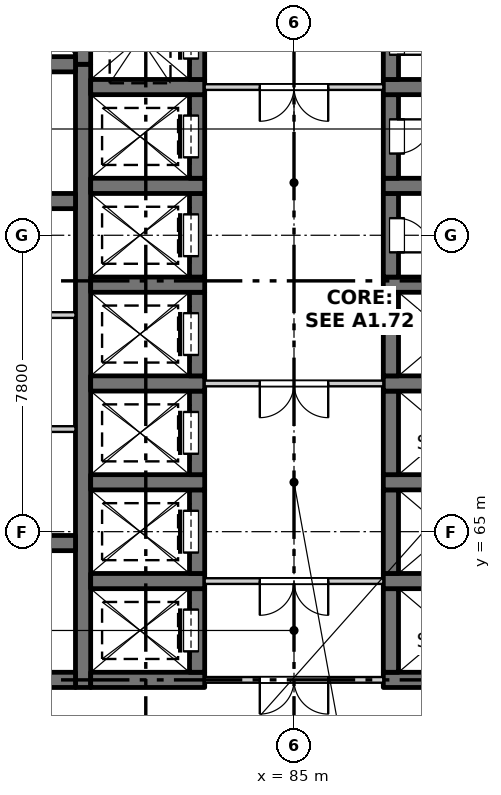
"""IFC4 building model, lengths in metres.
Left out: names, types, materials, properties, quantities, classifications, styles, units other than length and angle.
Written with IfcOpenShell. Run it as: python <this file> out.ifc"""

import sys

from ifc_helpers import new_model, si_unit, direction, frame, frame_2d, origin, place, context, subcontext, project, spatial, rectangle, extrude, element, fill, save


model = new_model("IFC4")
c1 = context("Model", 3, precision=1e-05, world=origin(), true_north=direction((0.0, 1.0)))
c2 = subcontext(c1, "Body", "Model", "MODEL_VIEW")
j1 = project(units=[si_unit("LENGTHUNIT", "METRE"), si_unit("PLANEANGLEUNIT", "RADIAN")], contexts=[c1])
p1 = place(None, origin())
s1 = spatial("IfcSite", under=j1, at=p1, CompositionType="ELEMENT")
p2 = place(p1, origin())
s2 = spatial("IfcBuilding", under=s1, at=p2, CompositionType="ELEMENT")
p3 = place(p2, frame((0.0, 0.0, 15.0)))
s3 = spatial("IfcBuildingStorey", under=s2, at=p3, CompositionType="ELEMENT", Elevation=15.0)
p4 = place(p3, frame((79.45, 60.9, -0.35), z_axis=(0.0, 0.0, 1.0), x_axis=(0.0, 1.0, 0.0)))
e1 = element("IfcWall", 1, at=p4, inside=s3, PredefinedType="SOLIDWALL", context=c2, shape_type="SweptSolid", body=[
    extrude(rectangle(XDim=16.4, YDim=0.4, at=frame_2d((8.2, 0.0))), origin(), (0.0, 0.0, 1.0), 4.6),
])
p5 = place(p3, frame((79.45, 77.3, -0.35), z_axis=(0.0, 0.0, 1.0), x_axis=(0.0, 1.0, 0.0)))
e2 = element("IfcWall", 2, at=p5, inside=s3, PredefinedType="SOLIDWALL", context=c2, shape_type="SweptSolid", body=[
    extrude(rectangle(XDim=6.85, YDim=0.4, at=frame_2d((3.425, 0.0))), origin(), (0.0, 0.0, 1.0), 4.6),
])
p6 = place(p3, frame((79.65, 61.1, -0.35), z_axis=(0.0, 0.0, 1.0), x_axis=(1.0, 0.0, 0.0)))
e3 = element("IfcWall", 3, at=p6, inside=s3, PredefinedType="SOLIDWALL", context=c2, shape_type="SweptSolid", body=[
    extrude(rectangle(XDim=3.0, YDim=0.4, at=frame_2d((1.5, 0.0))), origin(), (0.0, 0.0, 1.0), 4.6),
])
p7 = place(p3, frame((82.45, 61.3, -0.35), z_axis=(0.0, 0.0, 1.0), x_axis=(0.0, 1.0, 0.0)))
e4 = element("IfcWall", 4, at=p7, inside=s3, PredefinedType="SOLIDWALL", context=c2, shape_type="SweptSolid", body=[
    extrude(rectangle(XDim=2.2, YDim=0.4, at=frame_2d((1.1, 0.0))), origin(), (0.0, 0.0, 1.0), 4.6),
])
p8 = place(p7, frame((0.55, 0.0, 0.35)))
e5 = element("IfcOpeningElement", 5, at=p8, cuts=e4, PredefinedType="OPENING", context=c2, shape_type="SweptSolid", body=[
    extrude(rectangle(XDim=1.1, YDim=2.1, at=frame_2d((0.55, 1.05))), frame((0.0, 0.21, 0.0), z_axis=(0.0, -1.0, 0.0), x_axis=(1.0, 0.0, 0.0)), (0.0, 0.0, 1.0), 0.42),
])
p9 = place(p3, frame((79.65, 63.7, -0.35), z_axis=(0.0, 0.0, 1.0), x_axis=(1.0, 0.0, 0.0)))
e6 = element("IfcWall", 6, at=p9, inside=s3, PredefinedType="SOLIDWALL", context=c2, shape_type="SweptSolid", body=[
    extrude(rectangle(XDim=3.0, YDim=0.4, at=frame_2d((1.5, 0.0))), origin(), (0.0, 0.0, 1.0), 4.6),
])
p10 = place(p3, frame((82.45, 63.9, -0.35), z_axis=(0.0, 0.0, 1.0), x_axis=(0.0, 1.0, 0.0)))
e7 = element("IfcWall", 7, at=p10, inside=s3, PredefinedType="SOLIDWALL", context=c2, shape_type="SweptSolid", body=[
    extrude(rectangle(XDim=2.2, YDim=0.4, at=frame_2d((1.1, 0.0))), origin(), (0.0, 0.0, 1.0), 4.6),
])
p11 = place(p10, frame((0.55, 0.0, 0.35)))
e8 = element("IfcOpeningElement", 8, at=p11, cuts=e7, PredefinedType="OPENING", context=c2, shape_type="SweptSolid", body=[
    extrude(rectangle(XDim=1.1, YDim=2.1, at=frame_2d((0.55, 1.05))), frame((0.0, 0.21, 0.0), z_axis=(0.0, -1.0, 0.0), x_axis=(1.0, 0.0, 0.0)), (0.0, 0.0, 1.0), 0.42),
])
p12 = place(p3, frame((79.65, 66.3, -0.35), z_axis=(0.0, 0.0, 1.0), x_axis=(1.0, 0.0, 0.0)))
e9 = element("IfcWall", 9, at=p12, inside=s3, PredefinedType="SOLIDWALL", context=c2, shape_type="SweptSolid", body=[
    extrude(rectangle(XDim=3.0, YDim=0.4, at=frame_2d((1.5, 0.0))), origin(), (0.0, 0.0, 1.0), 4.6),
])
p13 = place(p3, frame((82.45, 66.5, -0.35), z_axis=(0.0, 0.0, 1.0), x_axis=(0.0, 1.0, 0.0)))
e10 = element("IfcWall", 10, at=p13, inside=s3, PredefinedType="SOLIDWALL", context=c2, shape_type="SweptSolid", body=[
    extrude(rectangle(XDim=2.2, YDim=0.4, at=frame_2d((1.1, 0.0))), origin(), (0.0, 0.0, 1.0), 4.6),
])
p14 = place(p13, frame((0.55, 0.0, 0.35)))
e11 = element("IfcOpeningElement", 11, at=p14, cuts=e10, PredefinedType="OPENING", context=c2, shape_type="SweptSolid", body=[
    extrude(rectangle(XDim=1.1, YDim=2.1, at=frame_2d((0.55, 1.05))), frame((0.0, 0.21, 0.0), z_axis=(0.0, -1.0, 0.0), x_axis=(1.0, 0.0, 0.0)), (0.0, 0.0, 1.0), 0.42),
])
p15 = place(p3, frame((79.65, 68.9, -0.35), z_axis=(0.0, 0.0, 1.0), x_axis=(1.0, 0.0, 0.0)))
e12 = element("IfcWall", 12, at=p15, inside=s3, PredefinedType="SOLIDWALL", context=c2, shape_type="SweptSolid", body=[
    extrude(rectangle(XDim=3.0, YDim=0.4, at=frame_2d((1.5, 0.0))), origin(), (0.0, 0.0, 1.0), 4.6),
])
p16 = place(p3, frame((82.45, 69.1, -0.35), z_axis=(0.0, 0.0, 1.0), x_axis=(0.0, 1.0, 0.0)))
e13 = element("IfcWall", 13, at=p16, inside=s3, PredefinedType="SOLIDWALL", context=c2, shape_type="SweptSolid", body=[
    extrude(rectangle(XDim=2.2, YDim=0.4, at=frame_2d((1.1, 0.0))), origin(), (0.0, 0.0, 1.0), 4.6),
])
p17 = place(p16, frame((0.55, 0.0, 0.35)))
e14 = element("IfcOpeningElement", 14, at=p17, cuts=e13, PredefinedType="OPENING", context=c2, shape_type="SweptSolid", body=[
    extrude(rectangle(XDim=1.1, YDim=2.1, at=frame_2d((0.55, 1.05))), frame((0.0, 0.21, 0.0), z_axis=(0.0, -1.0, 0.0), x_axis=(1.0, 0.0, 0.0)), (0.0, 0.0, 1.0), 0.42),
])
p18 = place(p3, frame((79.65, 71.5, -0.35), z_axis=(0.0, 0.0, 1.0), x_axis=(1.0, 0.0, 0.0)))
e15 = element("IfcWall", 15, at=p18, inside=s3, PredefinedType="SOLIDWALL", context=c2, shape_type="SweptSolid", body=[
    extrude(rectangle(XDim=3.0, YDim=0.4, at=frame_2d((1.5, 0.0))), origin(), (0.0, 0.0, 1.0), 4.6),
])
p19 = place(p3, frame((82.45, 71.7, -0.35), z_axis=(0.0, 0.0, 1.0), x_axis=(0.0, 1.0, 0.0)))
e16 = element("IfcWall", 16, at=p19, inside=s3, PredefinedType="SOLIDWALL", context=c2, shape_type="SweptSolid", body=[
    extrude(rectangle(XDim=2.2, YDim=0.4, at=frame_2d((1.1, 0.0))), origin(), (0.0, 0.0, 1.0), 4.6),
])
p20 = place(p19, frame((0.55, 0.0, 0.35)))
e17 = element("IfcOpeningElement", 17, at=p20, cuts=e16, PredefinedType="OPENING", context=c2, shape_type="SweptSolid", body=[
    extrude(rectangle(XDim=1.1, YDim=2.1, at=frame_2d((0.55, 1.05))), frame((0.0, 0.21, 0.0), z_axis=(0.0, -1.0, 0.0), x_axis=(1.0, 0.0, 0.0)), (0.0, 0.0, 1.0), 0.42),
])
p21 = place(p3, frame((79.65, 74.1, -0.35), z_axis=(0.0, 0.0, 1.0), x_axis=(1.0, 0.0, 0.0)))
e18 = element("IfcWall", 18, at=p21, inside=s3, PredefinedType="SOLIDWALL", context=c2, shape_type="SweptSolid", body=[
    extrude(rectangle(XDim=3.0, YDim=0.4, at=frame_2d((1.5, 0.0))), origin(), (0.0, 0.0, 1.0), 4.6),
])
p22 = place(p3, frame((82.45, 74.3, -0.35), z_axis=(0.0, 0.0, 1.0), x_axis=(0.0, 1.0, 0.0)))
e19 = element("IfcWall", 19, at=p22, inside=s3, PredefinedType="SOLIDWALL", context=c2, shape_type="SweptSolid", body=[
    extrude(rectangle(XDim=2.2, YDim=0.4, at=frame_2d((1.1, 0.0))), origin(), (0.0, 0.0, 1.0), 4.6),
])
p23 = place(p22, frame((0.55, 0.0, 0.35)))
e20 = element("IfcOpeningElement", 20, at=p23, cuts=e19, PredefinedType="OPENING", context=c2, shape_type="SweptSolid", body=[
    extrude(rectangle(XDim=1.1, YDim=2.1, at=frame_2d((0.55, 1.05))), frame((0.0, 0.21, 0.0), z_axis=(0.0, -1.0, 0.0), x_axis=(1.0, 0.0, 0.0)), (0.0, 0.0, 1.0), 0.42),
])
p24 = place(p3, frame((79.65, 76.7, -0.35), z_axis=(0.0, 0.0, 1.0), x_axis=(1.0, 0.0, 0.0)))
e21 = element("IfcWall", 21, at=p24, inside=s3, PredefinedType="SOLIDWALL", context=c2, shape_type="SweptSolid", body=[
    extrude(rectangle(XDim=3.0, YDim=0.4, at=frame_2d((1.5, 0.0))), origin(), (0.0, 0.0, 1.0), 4.6),
])
p25 = place(p3, frame((82.45, 76.9, -0.35), z_axis=(0.0, 0.0, 1.0), x_axis=(0.0, 1.0, 0.0)))
e22 = element("IfcWall", 22, at=p25, inside=s3, PredefinedType="SOLIDWALL", context=c2, shape_type="SweptSolid", body=[
    extrude(rectangle(XDim=2.2, YDim=0.4, at=frame_2d((1.1, 0.0))), origin(), (0.0, 0.0, 1.0), 4.6),
])
p26 = place(p25, frame((0.55, 0.0, 0.35)))
e23 = element("IfcOpeningElement", 23, at=p26, cuts=e22, PredefinedType="OPENING", context=c2, shape_type="SweptSolid", body=[
    extrude(rectangle(XDim=1.1, YDim=2.1, at=frame_2d((0.55, 1.05))), frame((0.0, 0.21, 0.0), z_axis=(0.0, -1.0, 0.0), x_axis=(1.0, 0.0, 0.0)), (0.0, 0.0, 1.0), 0.42),
])
p27 = place(p3, frame((87.35, 61.1, -0.35), z_axis=(0.0, 0.0, 1.0), x_axis=(1.0, 0.0, 0.0)))
e24 = element("IfcWall", 24, at=p27, inside=s3, PredefinedType="SOLIDWALL", context=c2, shape_type="SweptSolid", body=[
    extrude(rectangle(XDim=3.0, YDim=0.4, at=frame_2d((1.5, 0.0))), origin(), (0.0, 0.0, 1.0), 4.6),
])
p28 = place(p3, frame((87.55, 61.3, -0.35), z_axis=(0.0, 0.0, 1.0), x_axis=(0.0, 1.0, 0.0)))
e25 = element("IfcWall", 25, at=p28, inside=s3, PredefinedType="SOLIDWALL", context=c2, shape_type="SweptSolid", body=[
    extrude(rectangle(XDim=2.2, YDim=0.4, at=frame_2d((1.1, 0.0))), origin(), (0.0, 0.0, 1.0), 4.6),
])
p29 = place(p3, frame((87.35, 63.7, -0.35), z_axis=(0.0, 0.0, 1.0), x_axis=(1.0, 0.0, 0.0)))
e26 = element("IfcWall", 26, at=p29, inside=s3, PredefinedType="SOLIDWALL", context=c2, shape_type="SweptSolid", body=[
    extrude(rectangle(XDim=3.0, YDim=0.4, at=frame_2d((1.5, 0.0))), origin(), (0.0, 0.0, 1.0), 4.6),
])
p30 = place(p3, frame((87.55, 63.9, -0.35), z_axis=(0.0, 0.0, 1.0), x_axis=(0.0, 1.0, 0.0)))
e27 = element("IfcWall", 27, at=p30, inside=s3, PredefinedType="SOLIDWALL", context=c2, shape_type="SweptSolid", body=[
    extrude(rectangle(XDim=2.2, YDim=0.4, at=frame_2d((1.1, 0.0))), origin(), (0.0, 0.0, 1.0), 4.6),
])
p31 = place(p3, frame((87.35, 66.3, -0.35), z_axis=(0.0, 0.0, 1.0), x_axis=(1.0, 0.0, 0.0)))
e28 = element("IfcWall", 28, at=p31, inside=s3, PredefinedType="SOLIDWALL", context=c2, shape_type="SweptSolid", body=[
    extrude(rectangle(XDim=3.0, YDim=0.4, at=frame_2d((1.5, 0.0))), origin(), (0.0, 0.0, 1.0), 4.6),
])
p32 = place(p3, frame((87.55, 66.5, -0.35), z_axis=(0.0, 0.0, 1.0), x_axis=(0.0, 1.0, 0.0)))
e29 = element("IfcWall", 29, at=p32, inside=s3, PredefinedType="SOLIDWALL", context=c2, shape_type="SweptSolid", body=[
    extrude(rectangle(XDim=2.2, YDim=0.4, at=frame_2d((1.1, 0.0))), origin(), (0.0, 0.0, 1.0), 4.6),
])
p33 = place(p3, frame((87.35, 68.9, -0.35), z_axis=(0.0, 0.0, 1.0), x_axis=(1.0, 0.0, 0.0)))
e30 = element("IfcWall", 30, at=p33, inside=s3, PredefinedType="SOLIDWALL", context=c2, shape_type="SweptSolid", body=[
    extrude(rectangle(XDim=3.0, YDim=0.4, at=frame_2d((1.5, 0.0))), origin(), (0.0, 0.0, 1.0), 4.6),
])
p34 = place(p3, frame((87.55, 69.1, -0.35), z_axis=(0.0, 0.0, 1.0), x_axis=(0.0, 1.0, 0.0)))
e31 = element("IfcWall", 31, at=p34, inside=s3, PredefinedType="SOLIDWALL", context=c2, shape_type="SweptSolid", body=[
    extrude(rectangle(XDim=2.2, YDim=0.4, at=frame_2d((1.1, 0.0))), origin(), (0.0, 0.0, 1.0), 4.6),
])
p35 = place(p3, frame((87.35, 71.5, -0.35), z_axis=(0.0, 0.0, 1.0), x_axis=(1.0, 0.0, 0.0)))
e32 = element("IfcWall", 32, at=p35, inside=s3, PredefinedType="SOLIDWALL", context=c2, shape_type="SweptSolid", body=[
    extrude(rectangle(XDim=3.0, YDim=0.4, at=frame_2d((1.5, 0.0))), origin(), (0.0, 0.0, 1.0), 4.6),
])
p36 = place(p3, frame((87.55, 71.7, -0.35), z_axis=(0.0, 0.0, 1.0), x_axis=(0.0, 1.0, 0.0)))
e33 = element("IfcWall", 33, at=p36, inside=s3, PredefinedType="SOLIDWALL", context=c2, shape_type="SweptSolid", body=[
    extrude(rectangle(XDim=2.2, YDim=0.4, at=frame_2d((1.1, 0.0))), origin(), (0.0, 0.0, 1.0), 4.6),
])
p37 = place(p36, frame((0.65, 0.0, 0.35)))
e34 = element("IfcOpeningElement", 34, at=p37, cuts=e33, PredefinedType="OPENING", context=c2, shape_type="SweptSolid", body=[
    extrude(rectangle(XDim=0.9, YDim=2.1, at=frame_2d((0.45, 1.05))), frame((0.0, 0.21, 0.0), z_axis=(0.0, -1.0, 0.0), x_axis=(1.0, 0.0, 0.0)), (0.0, 0.0, 1.0), 0.42),
])
p38 = place(p3, frame((87.35, 74.1, -0.35), z_axis=(0.0, 0.0, 1.0), x_axis=(1.0, 0.0, 0.0)))
e35 = element("IfcWall", 35, at=p38, inside=s3, PredefinedType="SOLIDWALL", context=c2, shape_type="SweptSolid", body=[
    extrude(rectangle(XDim=3.0, YDim=0.4, at=frame_2d((1.5, 0.0))), origin(), (0.0, 0.0, 1.0), 4.6),
])
p39 = place(p3, frame((87.55, 74.3, -0.35), z_axis=(0.0, 0.0, 1.0), x_axis=(0.0, 1.0, 0.0)))
e36 = element("IfcWall", 36, at=p39, inside=s3, PredefinedType="SOLIDWALL", context=c2, shape_type="SweptSolid", body=[
    extrude(rectangle(XDim=2.2, YDim=0.4, at=frame_2d((1.1, 0.0))), origin(), (0.0, 0.0, 1.0), 4.6),
])
p40 = place(p39, frame((0.65, 0.0, 0.35)))
e37 = element("IfcOpeningElement", 37, at=p40, cuts=e36, PredefinedType="OPENING", context=c2, shape_type="SweptSolid", body=[
    extrude(rectangle(XDim=0.9, YDim=2.1, at=frame_2d((0.45, 1.05))), frame((0.0, 0.21, 0.0), z_axis=(0.0, -1.0, 0.0), x_axis=(1.0, 0.0, 0.0)), (0.0, 0.0, 1.0), 0.42),
])
p41 = place(p3, frame((87.35, 76.7, -0.35), z_axis=(0.0, 0.0, 1.0), x_axis=(1.0, 0.0, 0.0)))
e38 = element("IfcWall", 38, at=p41, inside=s3, PredefinedType="SOLIDWALL", context=c2, shape_type="SweptSolid", body=[
    extrude(rectangle(XDim=3.0, YDim=0.4, at=frame_2d((1.5, 0.0))), origin(), (0.0, 0.0, 1.0), 4.6),
])
p42 = place(p3, frame((87.55, 76.9, -0.35), z_axis=(0.0, 0.0, 1.0), x_axis=(0.0, 1.0, 0.0)))
e39 = element("IfcWall", 39, at=p42, inside=s3, PredefinedType="SOLIDWALL", context=c2, shape_type="SweptSolid", body=[
    extrude(rectangle(XDim=2.2, YDim=0.4, at=frame_2d((1.1, 0.0))), origin(), (0.0, 0.0, 1.0), 4.6),
])
p43 = place(p42, frame((0.65, 0.0, 0.35)))
e40 = element("IfcOpeningElement", 40, at=p43, cuts=e39, PredefinedType="OPENING", context=c2, shape_type="SweptSolid", body=[
    extrude(rectangle(XDim=0.9, YDim=2.1, at=frame_2d((0.45, 1.05))), frame((0.0, 0.21, 0.0), z_axis=(0.0, -1.0, 0.0), x_axis=(1.0, 0.0, 0.0)), (0.0, 0.0, 1.0), 0.42),
])
for number, where, z_axis, x_axis in (
    (41, (75.6, 61.1, -0.35), (0.0, 0.0, 1.0), (1.0, 0.0, 0.0)),
    (42, (75.6, 64.7, -0.35), (0.0, 0.0, 1.0), (1.0, 0.0, 0.0)),
    (43, (75.6, 73.7, -0.35), (0.0, 0.0, 1.0), (1.0, 0.0, 0.0)),
    (44, (75.6, 77.3, -0.35), (0.0, 0.0, 1.0), (1.0, 0.0, 0.0)),
):
    element("IfcWall", number, at=place(p3, frame(where, z_axis=z_axis, x_axis=x_axis)), inside=s3, PredefinedType="SOLIDWALL", context=c2, shape_type="SweptSolid", body=[
        extrude(rectangle(XDim=3.65, YDim=0.4, at=frame_2d((1.825, 0.0))), origin(), (0.0, 0.0, 1.0), 4.6),
    ])
p44 = place(p3, frame((82.65, 61.1, 0.0), z_axis=(0.0, 0.0, 1.0), x_axis=(1.0, 0.0, 0.0)))
e45 = element("IfcWall", 45, at=p44, inside=s3, PredefinedType="PARTITIONING", context=c2, shape_type="SweptSolid", body=[
    extrude(rectangle(XDim=4.7, YDim=0.15, at=frame_2d((2.35, 0.0))), origin(), (0.0, 0.0, 1.0), 4.25),
])
p45 = place(p44, frame((1.45, 0.0, 0.0)))
e46 = element("IfcOpeningElement", 46, at=p45, cuts=e45, PredefinedType="OPENING", context=c2, shape_type="SweptSolid", body=[
    extrude(rectangle(XDim=1.8, YDim=2.1, at=frame_2d((0.9, 1.05))), frame((0.0, 0.085, 0.0), z_axis=(0.0, -1.0, 0.0), x_axis=(1.0, 0.0, 0.0)), (0.0, 0.0, 1.0), 0.17),
])
p46 = place(p3, frame((82.65, 63.7, 0.0), z_axis=(0.0, 0.0, 1.0), x_axis=(1.0, 0.0, 0.0)))
e47 = element("IfcWall", 47, at=p46, inside=s3, PredefinedType="PARTITIONING", context=c2, shape_type="SweptSolid", body=[
    extrude(rectangle(XDim=4.7, YDim=0.15, at=frame_2d((2.35, 0.0))), origin(), (0.0, 0.0, 1.0), 4.25),
])
p47 = place(p46, frame((1.45, 0.0, 0.0)))
e48 = element("IfcOpeningElement", 48, at=p47, cuts=e47, PredefinedType="OPENING", context=c2, shape_type="SweptSolid", body=[
    extrude(rectangle(XDim=1.8, YDim=2.1, at=frame_2d((0.9, 1.05))), frame((0.0, 0.085, 0.0), z_axis=(0.0, -1.0, 0.0), x_axis=(1.0, 0.0, 0.0)), (0.0, 0.0, 1.0), 0.17),
])
p48 = place(p3, frame((75.6, 67.7, 0.0), z_axis=(0.0, 0.0, 1.0), x_axis=(1.0, 0.0, 0.0)))
e49 = element("IfcWall", 49, at=p48, inside=s3, PredefinedType="PARTITIONING", context=c2, shape_type="SweptSolid", body=[
    extrude(rectangle(XDim=3.65, YDim=0.15, at=frame_2d((1.825, 0.0))), origin(), (0.0, 0.0, 1.0), 4.25),
])
p49 = place(p3, frame((82.65, 68.9, 0.0), z_axis=(0.0, 0.0, 1.0), x_axis=(1.0, 0.0, 0.0)))
e50 = element("IfcWall", 50, at=p49, inside=s3, PredefinedType="PARTITIONING", context=c2, shape_type="SweptSolid", body=[
    extrude(rectangle(XDim=4.7, YDim=0.15, at=frame_2d((2.35, 0.0))), origin(), (0.0, 0.0, 1.0), 4.25),
])
p50 = place(p49, frame((1.45, 0.0, 0.0)))
e51 = element("IfcOpeningElement", 51, at=p50, cuts=e50, PredefinedType="OPENING", context=c2, shape_type="SweptSolid", body=[
    extrude(rectangle(XDim=1.8, YDim=2.1, at=frame_2d((0.9, 1.05))), frame((0.0, 0.085, 0.0), z_axis=(0.0, -1.0, 0.0), x_axis=(1.0, 0.0, 0.0)), (0.0, 0.0, 1.0), 0.17),
])
p51 = place(p3, frame((75.6, 70.7, 0.0), z_axis=(0.0, 0.0, 1.0), x_axis=(1.0, 0.0, 0.0)))
e52 = element("IfcWall", 52, at=p51, inside=s3, PredefinedType="PARTITIONING", context=c2, shape_type="SweptSolid", body=[
    extrude(rectangle(XDim=3.65, YDim=0.15, at=frame_2d((1.825, 0.0))), origin(), (0.0, 0.0, 1.0), 4.25),
])
p52 = place(p3, frame((82.65, 76.7, 0.0), z_axis=(0.0, 0.0, 1.0), x_axis=(1.0, 0.0, 0.0)))
e53 = element("IfcWall", 53, at=p52, inside=s3, PredefinedType="PARTITIONING", context=c2, shape_type="SweptSolid", body=[
    extrude(rectangle(XDim=4.7, YDim=0.15, at=frame_2d((2.35, 0.0))), origin(), (0.0, 0.0, 1.0), 4.25),
])
p53 = place(p52, frame((1.45, 0.0, 0.0)))
e54 = element("IfcOpeningElement", 54, at=p53, cuts=e53, PredefinedType="OPENING", context=c2, shape_type="SweptSolid", body=[
    extrude(rectangle(XDim=1.8, YDim=2.1, at=frame_2d((0.9, 1.05))), frame((0.0, 0.085, 0.0), z_axis=(0.0, -1.0, 0.0), x_axis=(1.0, 0.0, 0.0)), (0.0, 0.0, 1.0), 0.17),
])
p54 = place(p45, origin())
e55 = element("IfcDoor", 55, at=p54, inside=s3, OperationType="DOUBLE_DOOR_SINGLE_SWING", PredefinedType="DOOR", context=c2, shape_type="SweptSolid", body=[
    extrude(rectangle(XDim=1.8, YDim=2.1, at=frame_2d((0.9, 1.05))), frame((0.0, 0.025, 0.0), z_axis=(0.0, -1.0, 0.0), x_axis=(1.0, 0.0, 0.0)), (0.0, 0.0, 1.0), 0.05),
])
fill(e46, e55)
p55 = place(p8, origin())
e56 = element("IfcDoor", 56, at=p55, inside=s3, OperationType="SLIDING_TO_RIGHT", PredefinedType="DOOR", context=c2, shape_type="SweptSolid", body=[
    extrude(rectangle(XDim=1.1, YDim=2.1, at=frame_2d((0.55, 1.05))), frame((0.0, 0.185, 0.0), z_axis=(0.0, -1.0, 0.0), x_axis=(1.0, 0.0, 0.0)), (0.0, 0.0, 1.0), 0.05),
])
fill(e5, e56)
p56 = place(p47, origin())
e57 = element("IfcDoor", 57, at=p56, inside=s3, OperationType="DOUBLE_DOOR_SINGLE_SWING", PredefinedType="DOOR", context=c2, shape_type="SweptSolid", body=[
    extrude(rectangle(XDim=1.8, YDim=2.1, at=frame_2d((0.9, 1.05))), frame((0.0, 0.025, 0.0), z_axis=(0.0, -1.0, 0.0), x_axis=(1.0, 0.0, 0.0)), (0.0, 0.0, 1.0), 0.05),
])
fill(e48, e57)
p57 = place(p11, origin())
e58 = element("IfcDoor", 58, at=p57, inside=s3, OperationType="SLIDING_TO_RIGHT", PredefinedType="DOOR", context=c2, shape_type="SweptSolid", body=[
    extrude(rectangle(XDim=1.1, YDim=2.1, at=frame_2d((0.55, 1.05))), frame((0.0, 0.185, 0.0), z_axis=(0.0, -1.0, 0.0), x_axis=(1.0, 0.0, 0.0)), (0.0, 0.0, 1.0), 0.05),
])
fill(e8, e58)
p58 = place(p14, origin())
e59 = element("IfcDoor", 59, at=p58, inside=s3, OperationType="SLIDING_TO_RIGHT", PredefinedType="DOOR", context=c2, shape_type="SweptSolid", body=[
    extrude(rectangle(XDim=1.1, YDim=2.1, at=frame_2d((0.55, 1.05))), frame((0.0, 0.185, 0.0), z_axis=(0.0, -1.0, 0.0), x_axis=(1.0, 0.0, 0.0)), (0.0, 0.0, 1.0), 0.05),
])
fill(e11, e59)
p59 = place(p50, origin())
e60 = element("IfcDoor", 60, at=p59, inside=s3, OperationType="DOUBLE_DOOR_SINGLE_SWING", PredefinedType="DOOR", context=c2, shape_type="SweptSolid", body=[
    extrude(rectangle(XDim=1.8, YDim=2.1, at=frame_2d((0.9, 1.05))), frame((0.0, 0.025, 0.0), z_axis=(0.0, -1.0, 0.0), x_axis=(1.0, 0.0, 0.0)), (0.0, 0.0, 1.0), 0.05),
])
fill(e51, e60)
p60 = place(p17, origin())
e61 = element("IfcDoor", 61, at=p60, inside=s3, OperationType="SLIDING_TO_LEFT", PredefinedType="DOOR", context=c2, shape_type="SweptSolid", body=[
    extrude(rectangle(XDim=1.1, YDim=2.1, at=frame_2d((0.55, 1.05))), frame((0.0, 0.185, 0.0), z_axis=(0.0, -1.0, 0.0), x_axis=(1.0, 0.0, 0.0)), (0.0, 0.0, 1.0), 0.05),
])
fill(e14, e61)
p61 = place(p20, origin())
e62 = element("IfcDoor", 62, at=p61, inside=s3, OperationType="SLIDING_TO_LEFT", PredefinedType="DOOR", context=c2, shape_type="SweptSolid", body=[
    extrude(rectangle(XDim=1.1, YDim=2.1, at=frame_2d((0.55, 1.05))), frame((0.0, 0.185, 0.0), z_axis=(0.0, -1.0, 0.0), x_axis=(1.0, 0.0, 0.0)), (0.0, 0.0, 1.0), 0.05),
])
fill(e17, e62)
p62 = place(p37, origin())
e63 = element("IfcDoor", 63, at=p62, inside=s3, OperationType="SINGLE_SWING_RIGHT", PredefinedType="DOOR", context=c2, shape_type="SweptSolid", body=[
    extrude(rectangle(XDim=0.9, YDim=2.1, at=frame_2d((0.45, 1.05))), frame((0.0, -0.135, 0.0), z_axis=(0.0, -1.0, 0.0), x_axis=(1.0, 0.0, 0.0)), (0.0, 0.0, 1.0), 0.05),
])
fill(e34, e63)
p63 = place(p23, origin())
e64 = element("IfcDoor", 64, at=p63, inside=s3, OperationType="SLIDING_TO_LEFT", PredefinedType="DOOR", context=c2, shape_type="SweptSolid", body=[
    extrude(rectangle(XDim=1.1, YDim=2.1, at=frame_2d((0.55, 1.05))), frame((0.0, 0.185, 0.0), z_axis=(0.0, -1.0, 0.0), x_axis=(1.0, 0.0, 0.0)), (0.0, 0.0, 1.0), 0.05),
])
fill(e20, e64)
p64 = place(p40, origin())
e65 = element("IfcDoor", 65, at=p64, inside=s3, OperationType="SINGLE_SWING_LEFT", PredefinedType="DOOR", context=c2, shape_type="SweptSolid", body=[
    extrude(rectangle(XDim=0.9, YDim=2.1, at=frame_2d((0.45, 1.05))), frame((0.0, -0.135, 0.0), z_axis=(0.0, -1.0, 0.0), x_axis=(1.0, 0.0, 0.0)), (0.0, 0.0, 1.0), 0.05),
])
fill(e37, e65)
p65 = place(p53, origin())
e66 = element("IfcDoor", 66, at=p65, inside=s3, OperationType="DOUBLE_DOOR_SINGLE_SWING", PredefinedType="DOOR", context=c2, shape_type="SweptSolid", body=[
    extrude(rectangle(XDim=1.8, YDim=2.1, at=frame_2d((0.9, 1.05))), frame((0.0, 0.025, 0.0), z_axis=(0.0, -1.0, 0.0), x_axis=(1.0, 0.0, 0.0)), (0.0, 0.0, 1.0), 0.05),
])
fill(e54, e66)
p66 = place(p26, origin())
e67 = element("IfcDoor", 67, at=p66, inside=s3, OperationType="SLIDING_TO_LEFT", PredefinedType="DOOR", context=c2, shape_type="SweptSolid", body=[
    extrude(rectangle(XDim=1.1, YDim=2.1, at=frame_2d((0.55, 1.05))), frame((0.0, 0.185, 0.0), z_axis=(0.0, -1.0, 0.0), x_axis=(1.0, 0.0, 0.0)), (0.0, 0.0, 1.0), 0.05),
])
fill(e23, e67)
p67 = place(p43, origin())
e68 = element("IfcDoor", 68, at=p67, inside=s3, OperationType="SINGLE_SWING_RIGHT", PredefinedType="DOOR", context=c2, shape_type="SweptSolid", body=[
    extrude(rectangle(XDim=0.9, YDim=2.1, at=frame_2d((0.45, 1.05))), frame((0.0, -0.135, 0.0), z_axis=(0.0, -1.0, 0.0), x_axis=(1.0, 0.0, 0.0)), (0.0, 0.0, 1.0), 0.05),
])
fill(e40, e68)
save(model, sys.argv[1])
